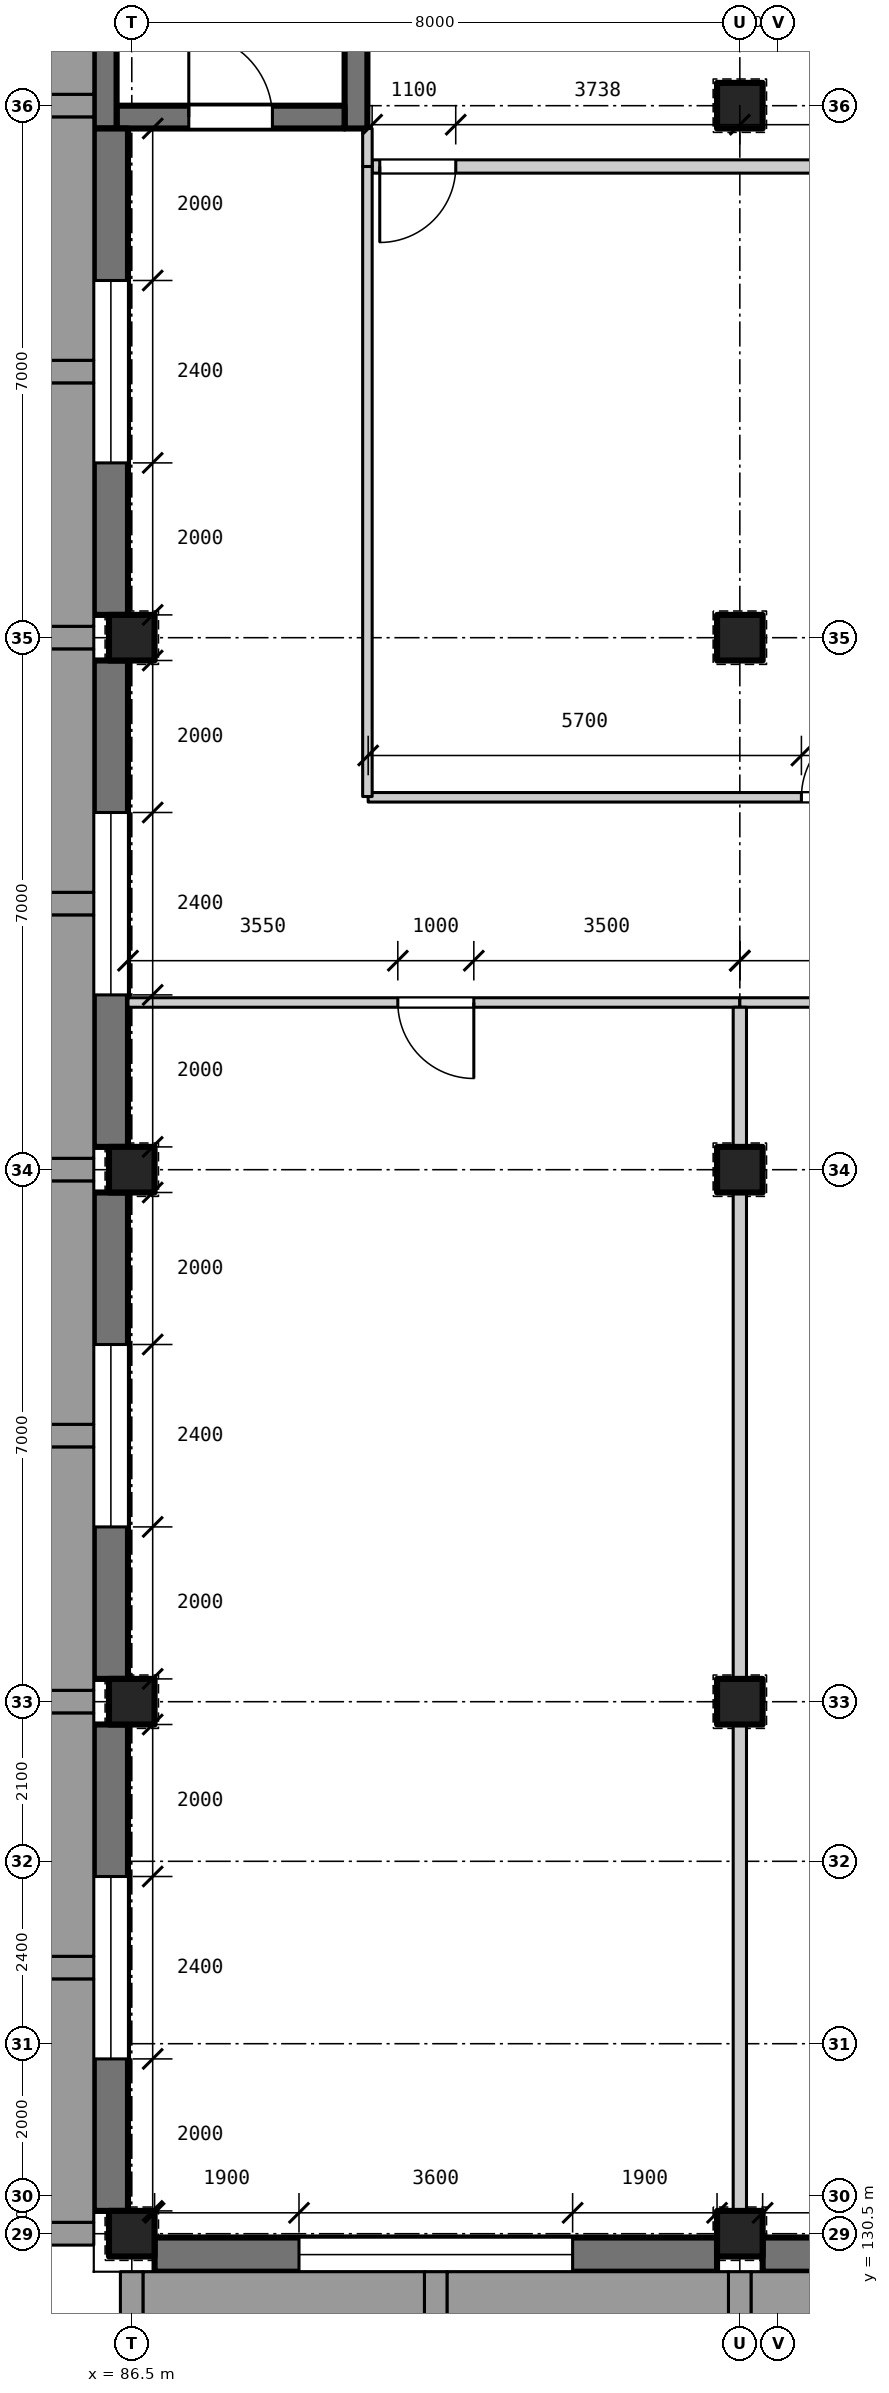
"""IFC4 building model, lengths in metres.
Left out: names, types, materials, properties, quantities, classifications, styles, units other than length and angle.
Written with IfcOpenShell. Run it as: python <this file> out.ifc"""

import sys

from ifc_helpers import new_model, si_unit, direction, frame, frame_2d, origin, origin_2d, place, context, subcontext, project, spatial, rectangle, extrude, element, fill, save


model = new_model("IFC4")
c1 = context("Model", 3, precision=1e-05, world=origin(), true_north=direction((0.0, 1.0)))
c2 = subcontext(c1, "Body", "Model", "MODEL_VIEW")
j1 = project(units=[si_unit("LENGTHUNIT", "METRE"), si_unit("PLANEANGLEUNIT", "RADIAN")], contexts=[c1])
p1 = place(None, origin())
s1 = spatial("IfcSite", under=j1, at=p1, CompositionType="ELEMENT")
p2 = place(p1, origin())
s2 = spatial("IfcBuilding", under=s1, at=p2, CompositionType="ELEMENT")
p3 = place(p2, frame((0.0, 0.0, 10.2)))
s3 = spatial("IfcBuildingStorey", under=s2, at=p3, CompositionType="ELEMENT", Elevation=10.2)
for number, where, z_axis, x_axis in (
    (1, (86.5, 130.5, 0.0), (0.0, 0.0, 1.0), (1.0, 0.0, 0.0)),
    (2, (86.5, 137.5, 0.0), (0.0, 0.0, 1.0), (1.0, 0.0, 0.0)),
    (3, (86.5, 144.5, 0.0), (0.0, 0.0, 1.0), (1.0, 0.0, 0.0)),
    (4, (86.5, 151.5, 0.0), (0.0, 0.0, 1.0), (1.0, 0.0, 0.0)),
    (5, (94.5, 130.5, 0.0), (0.0, 0.0, 1.0), (1.0, 0.0, 0.0)),
    (6, (94.5, 137.5, 0.0), (0.0, 0.0, 1.0), (1.0, 0.0, 0.0)),
    (7, (94.5, 144.5, 0.0), (0.0, 0.0, 1.0), (1.0, 0.0, 0.0)),
    (8, (94.5, 151.5, 0.0), (0.0, 0.0, 1.0), (1.0, 0.0, 0.0)),
    (9, (94.5, 158.5, 0.0), (0.0, 0.0, 1.0), (1.0, 0.0, 0.0)),
):
    element("IfcColumn", number, at=place(p3, frame(where, z_axis=z_axis, x_axis=x_axis)), inside=s3, PredefinedType="COLUMN", context=c2, shape_type="SweptSolid", body=[
        extrude(rectangle(XDim=0.6, YDim=0.6, at=origin_2d()), origin(), (0.0, 0.0, 1.0), 4.2),
    ])
p4 = place(p3, frame((89.45, 158.2, 0.0), z_axis=(0.0, 0.0, 1.0), x_axis=(0.0, 1.0, 0.0)))
e10 = element("IfcWall", 10, at=p4, inside=s3, PredefinedType="SHEAR", context=c2, shape_type="SweptSolid", body=[
    extrude(rectangle(XDim=7.5, YDim=0.3, at=frame_2d((3.75, 0.0))), origin(), (0.0, 0.0, 1.0), 4.2),
])
p5 = place(p3, frame((86.3, 158.35, 0.0), z_axis=(0.0, 0.0, 1.0), x_axis=(1.0, 0.0, 0.0)))
e11 = element("IfcWall", 11, at=p5, inside=s3, PredefinedType="SHEAR", context=c2, shape_type="SweptSolid", body=[
    extrude(rectangle(XDim=3.0, YDim=0.3, at=frame_2d((1.5, 0.0))), origin(), (0.0, 0.0, 1.0), 4.2),
])
p6 = place(p5, frame((0.95, 0.0, 0.0)))
e12 = element("IfcOpeningElement", 12, at=p6, cuts=e11, PredefinedType="OPENING", context=c2, shape_type="SweptSolid", body=[
    extrude(rectangle(XDim=1.1, YDim=2.1, at=frame_2d((0.55, 1.05))), frame((0.0, 0.16, 0.0), z_axis=(0.0, -1.0, 0.0), x_axis=(1.0, 0.0, 0.0)), (0.0, 0.0, 1.0), 0.32),
])
p7 = place(p3, frame((94.2, 130.225, 0.0), z_axis=(0.0, 0.0, 1.0), x_axis=(-1.0, 0.0, 0.0)))
e13 = element("IfcWall", 13, at=p7, inside=s3, PredefinedType="SOLIDWALL", context=c2, shape_type="SweptSolid", body=[
    extrude(rectangle(XDim=7.4, YDim=0.45, at=frame_2d((3.7, 0.0))), origin(), (0.0, 0.0, 1.0), 3.1),
])
p8 = place(p7, frame((1.9, 0.0, 0.9)))
e14 = element("IfcOpeningElement", 14, at=p8, cuts=e13, PredefinedType="OPENING", context=c2, shape_type="SweptSolid", body=[
    extrude(rectangle(XDim=3.6, YDim=1.6, at=frame_2d((1.8, 0.8))), frame((0.0, 0.235, 0.0), z_axis=(0.0, -1.0, 0.0), x_axis=(1.0, 0.0, 0.0)), (0.0, 0.0, 1.0), 0.47),
])
p9 = place(p3, frame((102.2, 130.225, 0.0), z_axis=(0.0, 0.0, 1.0), x_axis=(-1.0, 0.0, 0.0)))
e15 = element("IfcWall", 15, at=p9, inside=s3, PredefinedType="SOLIDWALL", context=c2, shape_type="SweptSolid", body=[
    extrude(rectangle(XDim=7.4, YDim=0.45, at=frame_2d((3.7, 0.0))), origin(), (0.0, 0.0, 1.0), 3.1),
])
p10 = place(p9, frame((1.9, 0.0, 0.9)))
e16 = element("IfcOpeningElement", 16, at=p10, cuts=e15, PredefinedType="OPENING", context=c2, shape_type="SweptSolid", body=[
    extrude(rectangle(XDim=3.6, YDim=1.6, at=frame_2d((1.8, 0.8))), frame((0.0, 0.235, 0.0), z_axis=(0.0, -1.0, 0.0), x_axis=(1.0, 0.0, 0.0)), (0.0, 0.0, 1.0), 0.47),
])
p11 = place(p3, frame((86.15, 158.2, 0.0), z_axis=(0.0, 0.0, 1.0), x_axis=(0.0, 1.0, 0.0)))
e17 = element("IfcWall", 17, at=p11, inside=s3, PredefinedType="SOLIDWALL", context=c2, shape_type="SweptSolid", body=[
    extrude(rectangle(XDim=7.5, YDim=0.3, at=frame_2d((3.75, 0.0))), origin(), (0.0, 0.0, 1.0), 3.9),
])
p12 = place(p3, frame((86.225, 130.8, 0.0), z_axis=(0.0, 0.0, 1.0), x_axis=(0.0, 1.0, 0.0)))
e18 = element("IfcWall", 18, at=p12, inside=s3, PredefinedType="SOLIDWALL", context=c2, shape_type="SweptSolid", body=[
    extrude(rectangle(XDim=6.4, YDim=0.45, at=frame_2d((3.2, 0.0))), origin(), (0.0, 0.0, 1.0), 3.2),
])
p13 = place(p12, frame((2.0, 0.0, 0.9)))
e19 = element("IfcOpeningElement", 19, at=p13, cuts=e18, PredefinedType="OPENING", context=c2, shape_type="SweptSolid", body=[
    extrude(rectangle(XDim=2.4, YDim=1.6, at=frame_2d((1.2, 0.8))), frame((0.0, 0.235, 0.0), z_axis=(0.0, -1.0, 0.0), x_axis=(1.0, 0.0, 0.0)), (0.0, 0.0, 1.0), 0.47),
])
p14 = place(p3, frame((86.225, 137.8, 0.0), z_axis=(0.0, 0.0, 1.0), x_axis=(0.0, 1.0, 0.0)))
e20 = element("IfcWall", 20, at=p14, inside=s3, PredefinedType="SOLIDWALL", context=c2, shape_type="SweptSolid", body=[
    extrude(rectangle(XDim=6.4, YDim=0.45, at=frame_2d((3.2, 0.0))), origin(), (0.0, 0.0, 1.0), 3.2),
])
p15 = place(p14, frame((2.0, 0.0, 0.9)))
e21 = element("IfcOpeningElement", 21, at=p15, cuts=e20, PredefinedType="OPENING", context=c2, shape_type="SweptSolid", body=[
    extrude(rectangle(XDim=2.4, YDim=1.6, at=frame_2d((1.2, 0.8))), frame((0.0, 0.235, 0.0), z_axis=(0.0, -1.0, 0.0), x_axis=(1.0, 0.0, 0.0)), (0.0, 0.0, 1.0), 0.47),
])
p16 = place(p3, frame((86.225, 144.8, 0.0), z_axis=(0.0, 0.0, 1.0), x_axis=(0.0, 1.0, 0.0)))
e22 = element("IfcWall", 22, at=p16, inside=s3, PredefinedType="SOLIDWALL", context=c2, shape_type="SweptSolid", body=[
    extrude(rectangle(XDim=6.4, YDim=0.45, at=frame_2d((3.2, 0.0))), origin(), (0.0, 0.0, 1.0), 3.2),
])
p17 = place(p16, frame((2.0, 0.0, 0.9)))
e23 = element("IfcOpeningElement", 23, at=p17, cuts=e22, PredefinedType="OPENING", context=c2, shape_type="SweptSolid", body=[
    extrude(rectangle(XDim=2.4, YDim=1.6, at=frame_2d((1.2, 0.8))), frame((0.0, 0.235, 0.0), z_axis=(0.0, -1.0, 0.0), x_axis=(1.0, 0.0, 0.0)), (0.0, 0.0, 1.0), 0.47),
])
p18 = place(p3, frame((86.225, 151.8, 0.0), z_axis=(0.0, 0.0, 1.0), x_axis=(0.0, 1.0, 0.0)))
e24 = element("IfcWall", 24, at=p18, inside=s3, PredefinedType="SOLIDWALL", context=c2, shape_type="SweptSolid", body=[
    extrude(rectangle(XDim=6.4, YDim=0.45, at=frame_2d((3.2, 0.0))), origin(), (0.0, 0.0, 1.0), 3.2),
])
p19 = place(p18, frame((2.0, 0.0, 0.9)))
e25 = element("IfcOpeningElement", 25, at=p19, cuts=e24, PredefinedType="OPENING", context=c2, shape_type="SweptSolid", body=[
    extrude(rectangle(XDim=2.4, YDim=1.6, at=frame_2d((1.2, 0.8))), frame((0.0, 0.235, 0.0), z_axis=(0.0, -1.0, 0.0), x_axis=(1.0, 0.0, 0.0)), (0.0, 0.0, 1.0), 0.47),
])
p20 = place(p3, frame((86.45, 146.7, 0.0), z_axis=(0.0, 0.0, 1.0), x_axis=(1.0, 0.0, 0.0)))
e26 = element("IfcWall", 26, at=p20, inside=s3, PredefinedType="PARTITIONING", context=c2, shape_type="SweptSolid", body=[
    extrude(rectangle(XDim=8.05, YDim=0.125, at=frame_2d((4.025, 0.0))), origin(), (0.0, 0.0, 1.0), 3.9),
])
p21 = place(p20, frame((3.55, 0.0, 0.0)))
e27 = element("IfcOpeningElement", 27, at=p21, cuts=e26, PredefinedType="OPENING", context=c2, shape_type="SweptSolid", body=[
    extrude(rectangle(XDim=1.0, YDim=2.1, at=frame_2d((0.5, 1.05))), frame((0.0, 0.073, 0.0), z_axis=(0.0, -1.0, 0.0), x_axis=(1.0, 0.0, 0.0)), (0.0, 0.0, 1.0), 0.145),
])
p22 = place(p3, frame((94.5, 146.7, 0.0), z_axis=(0.0, 0.0, 1.0), x_axis=(1.0, 0.0, 0.0)))
e28 = element("IfcWall", 28, at=p22, inside=s3, PredefinedType="PARTITIONING", context=c2, shape_type="SweptSolid", body=[
    extrude(rectangle(XDim=8.0, YDim=0.125, at=frame_2d((4.0, 0.0))), origin(), (0.0, 0.0, 1.0), 3.9),
])
p23 = place(p22, frame((3.5, 0.0, 0.0)))
e29 = element("IfcOpeningElement", 29, at=p23, cuts=e28, PredefinedType="OPENING", context=c2, shape_type="SweptSolid", body=[
    extrude(rectangle(XDim=1.0, YDim=2.1, at=frame_2d((0.5, 1.05))), frame((0.0, 0.073, 0.0), z_axis=(0.0, -1.0, 0.0), x_axis=(1.0, 0.0, 0.0)), (0.0, 0.0, 1.0), 0.145),
])
p24 = place(p3, frame((89.61, 149.4, 0.0), z_axis=(0.0, 0.0, 1.0), x_axis=(1.0, 0.0, 0.0)))
e30 = element("IfcWall", 30, at=p24, inside=s3, PredefinedType="PARTITIONING", context=c2, shape_type="SweptSolid", body=[
    extrude(rectangle(XDim=12.38, YDim=0.125, at=frame_2d((6.19, 0.0))), origin(), (0.0, 0.0, 1.0), 3.9),
])
p25 = place(p24, frame((5.7, 0.0, 0.0)))
e31 = element("IfcOpeningElement", 31, at=p25, cuts=e30, PredefinedType="OPENING", context=c2, shape_type="SweptSolid", body=[
    extrude(rectangle(XDim=1.0, YDim=2.1, at=frame_2d((0.5, 1.05))), frame((0.0, 0.073, 0.0), z_axis=(0.0, -1.0, 0.0), x_axis=(1.0, 0.0, 0.0)), (0.0, 0.0, 1.0), 0.145),
])
p26 = place(p3, frame((89.663, 157.7, 0.0), z_axis=(0.0, 0.0, 1.0), x_axis=(1.0, 0.0, 0.0)))
e32 = element("IfcWall", 32, at=p26, inside=s3, PredefinedType="PARTITIONING", context=c2, shape_type="SweptSolid", body=[
    extrude(rectangle(XDim=12.275, YDim=0.175, at=frame_2d((6.137, 0.0))), origin(), (0.0, 0.0, 1.0), 3.9),
])
p27 = place(p26, frame((0.1, 0.0, 0.0)))
e33 = element("IfcOpeningElement", 33, at=p27, cuts=e32, PredefinedType="OPENING", context=c2, shape_type="SweptSolid", body=[
    extrude(rectangle(XDim=1.0, YDim=2.1, at=frame_2d((0.5, 1.05))), frame((0.0, 0.097, 0.0), z_axis=(0.0, -1.0, 0.0), x_axis=(1.0, 0.0, 0.0)), (0.0, 0.0, 1.0), 0.195),
])
p28 = place(p3, frame((89.6, 149.41, 0.0), z_axis=(0.0, 0.0, 1.0), x_axis=(0.0, 1.0, 0.0)))
e34 = element("IfcWall", 34, at=p28, inside=s3, PredefinedType="PARTITIONING", context=c2, shape_type="SweptSolid", body=[
    extrude(rectangle(XDim=8.29, YDim=0.125, at=frame_2d((4.145, 0.0))), origin(), (0.0, 0.0, 1.0), 3.9),
])
p29 = place(p3, frame((89.6, 157.7, 0.0), z_axis=(0.0, 0.0, 1.0), x_axis=(0.0, 1.0, 0.0)))
e35 = element("IfcWall", 35, at=p29, inside=s3, PredefinedType="PARTITIONING", context=c2, shape_type="SweptSolid", body=[
    extrude(rectangle(XDim=0.5, YDim=0.125, at=frame_2d((0.25, 0.0))), origin(), (0.0, 0.0, 1.0), 3.9),
])
for number, where, z_axis, x_axis in (
    (36, (94.5, 130.8, 0.0), (0.0, 0.0, 1.0), (0.0, 1.0, 0.0)),
    (37, (94.5, 137.8, 0.0), (0.0, 0.0, 1.0), (0.0, 1.0, 0.0)),
):
    element("IfcWall", number, at=place(p3, frame(where, z_axis=z_axis, x_axis=x_axis)), inside=s3, PredefinedType="PARTITIONING", context=c2, shape_type="SweptSolid", body=[
        extrude(rectangle(XDim=6.4, YDim=0.175, at=frame_2d((3.2, 0.0))), origin(), (0.0, 0.0, 1.0), 3.2),
    ])
p30 = place(p3, frame((94.5, 144.8, 0.0), z_axis=(0.0, 0.0, 1.0), x_axis=(0.0, 1.0, 0.0)))
e38 = element("IfcWall", 38, at=p30, inside=s3, PredefinedType="PARTITIONING", context=c2, shape_type="SweptSolid", body=[
    extrude(rectangle(XDim=1.837, YDim=0.175, at=frame_2d((0.919, 0.0))), origin(), (0.0, 0.0, 1.0), 3.2),
])
p31 = place(p8, origin())
e39 = element("IfcWindow", 39, at=p31, inside=s3, PartitioningType="SINGLE_PANEL", PredefinedType="WINDOW", context=c2, shape_type="SweptSolid", body=[
    extrude(rectangle(XDim=3.6, YDim=1.6, at=frame_2d((1.8, 0.8))), frame((0.0, -0.125, 0.0), z_axis=(0.0, -1.0, 0.0), x_axis=(1.0, 0.0, 0.0)), (0.0, 0.0, 1.0), 0.06),
])
fill(e14, e39)
p32 = place(p13, origin())
e40 = element("IfcWindow", 40, at=p32, inside=s3, PartitioningType="SINGLE_PANEL", PredefinedType="WINDOW", context=c2, shape_type="SweptSolid", body=[
    extrude(rectangle(XDim=2.4, YDim=1.6, at=frame_2d((1.2, 0.8))), frame((0.0, -0.125, 0.0), z_axis=(0.0, -1.0, 0.0), x_axis=(1.0, 0.0, 0.0)), (0.0, 0.0, 1.0), 0.06),
])
fill(e19, e40)
p33 = place(p15, origin())
e41 = element("IfcWindow", 41, at=p33, inside=s3, PartitioningType="SINGLE_PANEL", PredefinedType="WINDOW", context=c2, shape_type="SweptSolid", body=[
    extrude(rectangle(XDim=2.4, YDim=1.6, at=frame_2d((1.2, 0.8))), frame((0.0, -0.125, 0.0), z_axis=(0.0, -1.0, 0.0), x_axis=(1.0, 0.0, 0.0)), (0.0, 0.0, 1.0), 0.06),
])
fill(e21, e41)
p34 = place(p17, origin())
e42 = element("IfcWindow", 42, at=p34, inside=s3, PartitioningType="SINGLE_PANEL", PredefinedType="WINDOW", context=c2, shape_type="SweptSolid", body=[
    extrude(rectangle(XDim=2.4, YDim=1.6, at=frame_2d((1.2, 0.8))), frame((0.0, -0.125, 0.0), z_axis=(0.0, -1.0, 0.0), x_axis=(1.0, 0.0, 0.0)), (0.0, 0.0, 1.0), 0.06),
])
fill(e23, e42)
p35 = place(p19, origin())
e43 = element("IfcWindow", 43, at=p35, inside=s3, PartitioningType="SINGLE_PANEL", PredefinedType="WINDOW", context=c2, shape_type="SweptSolid", body=[
    extrude(rectangle(XDim=2.4, YDim=1.6, at=frame_2d((1.2, 0.8))), frame((0.0, -0.125, 0.0), z_axis=(0.0, -1.0, 0.0), x_axis=(1.0, 0.0, 0.0)), (0.0, 0.0, 1.0), 0.06),
])
fill(e25, e43)
p36 = place(p21, frame((1.0, 0.0, 0.0), z_axis=(0.0, 0.0, 1.0), x_axis=(-1.0, 0.0, 0.0)))
e44 = element("IfcDoor", 44, at=p36, inside=s3, OperationType="SINGLE_SWING_LEFT", PredefinedType="DOOR", context=c2, shape_type="SweptSolid", body=[
    extrude(rectangle(XDim=1.0, YDim=2.1, at=frame_2d((0.5, 1.05))), frame((0.0, 0.025, 0.0), z_axis=(0.0, -1.0, 0.0), x_axis=(1.0, 0.0, 0.0)), (0.0, 0.0, 1.0), 0.05),
])
fill(e27, e44)
p37 = place(p25, origin())
e45 = element("IfcDoor", 45, at=p37, inside=s3, OperationType="SINGLE_SWING_RIGHT", PredefinedType="DOOR", context=c2, shape_type="SweptSolid", body=[
    extrude(rectangle(XDim=1.0, YDim=2.1, at=frame_2d((0.5, 1.05))), frame((0.0, 0.025, 0.0), z_axis=(0.0, -1.0, 0.0), x_axis=(1.0, 0.0, 0.0)), (0.0, 0.0, 1.0), 0.05),
])
fill(e31, e45)
p38 = place(p27, frame((1.0, 0.0, 0.0), z_axis=(0.0, 0.0, 1.0), x_axis=(-1.0, 0.0, 0.0)))
e46 = element("IfcDoor", 46, at=p38, inside=s3, OperationType="SINGLE_SWING_RIGHT", PredefinedType="DOOR", context=c2, shape_type="SweptSolid", body=[
    extrude(rectangle(XDim=1.0, YDim=2.1, at=frame_2d((0.5, 1.05))), frame((0.0, 0.025, 0.0), z_axis=(0.0, -1.0, 0.0), x_axis=(1.0, 0.0, 0.0)), (0.0, 0.0, 1.0), 0.05),
])
fill(e33, e46)
p39 = place(p6, origin())
e47 = element("IfcDoor", 47, at=p39, inside=s3, OperationType="SINGLE_SWING_LEFT", PredefinedType="DOOR", context=c2, shape_type="SweptSolid", body=[
    extrude(rectangle(XDim=1.1, YDim=2.1, at=frame_2d((0.55, 1.05))), frame((0.0, 0.025, 0.0), z_axis=(0.0, -1.0, 0.0), x_axis=(1.0, 0.0, 0.0)), (0.0, 0.0, 1.0), 0.05),
])
fill(e12, e47)
save(model, sys.argv[1])
